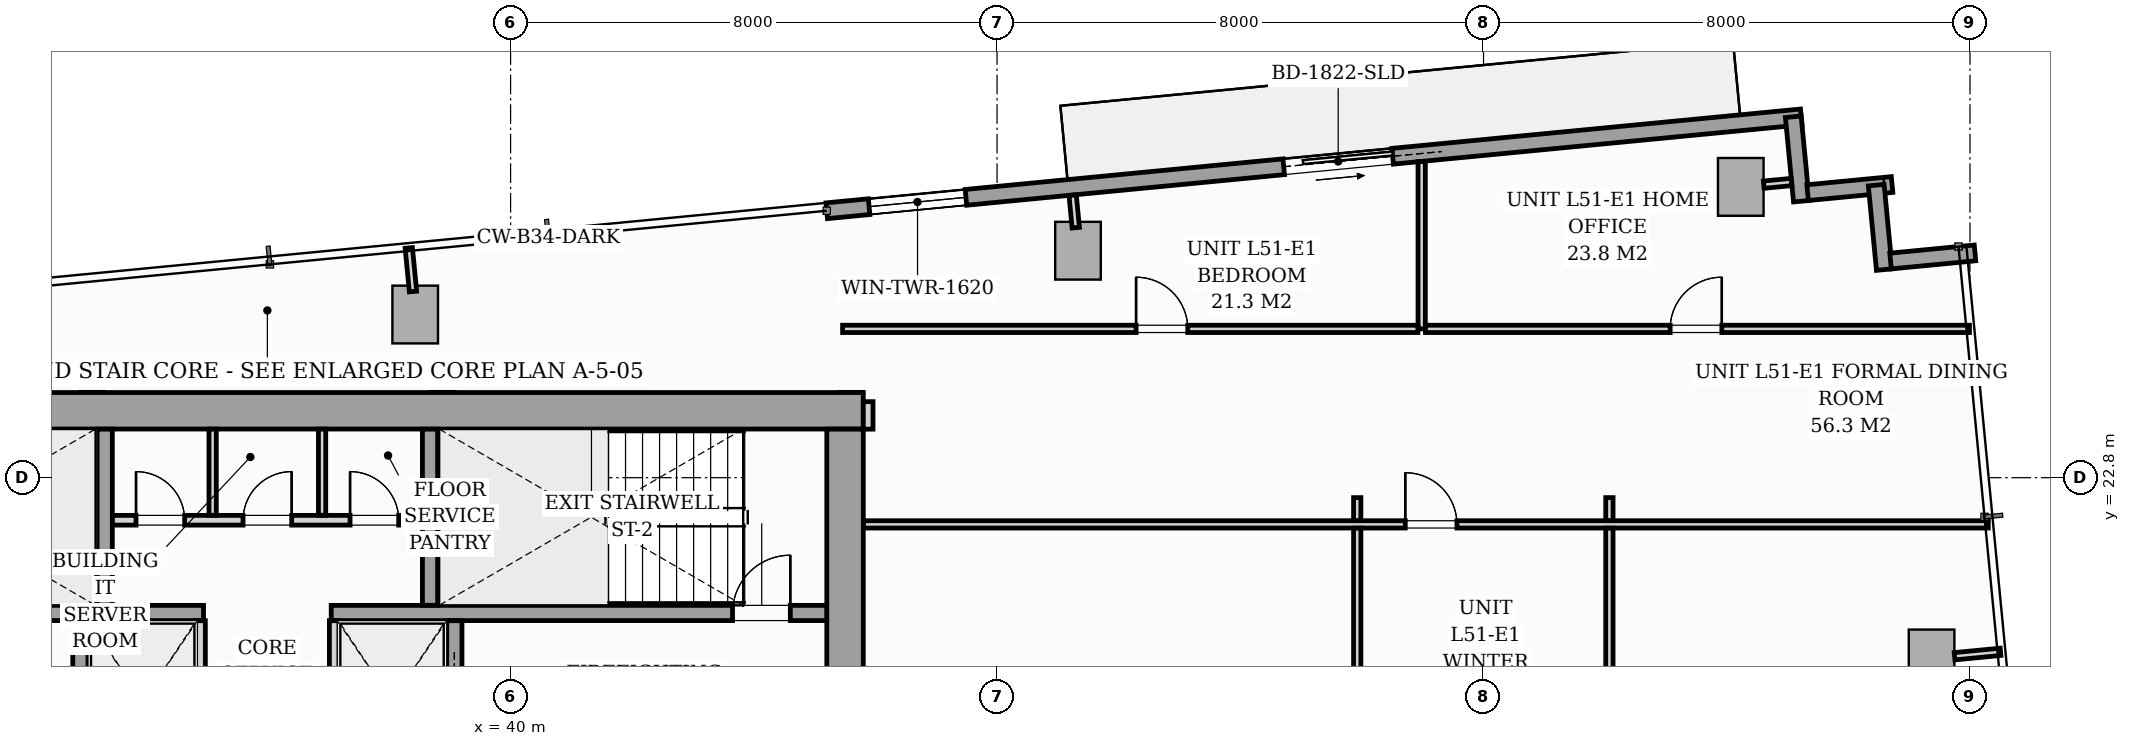
"""IFC4 building model, lengths in metres.
Left out: names, types, materials, properties, quantities, classifications, styles, units other than length and angle.
Written with IfcOpenShell. Run it as: python <this file> out.ifc"""

import sys

from ifc_helpers import new_model, si_unit, direction, frame, frame_2d, origin, origin_2d, place, context, subcontext, project, spatial, rectangle, i_section, extrude, source, transform, mapped, element, fill, save


model = new_model("IFC4")
c1 = context("Model", 3, precision=1e-05, world=origin(), true_north=direction((0.0, 1.0)))
c2 = subcontext(c1, "Body", "Model", "MODEL_VIEW")
j1 = project(units=[si_unit("LENGTHUNIT", "METRE"), si_unit("PLANEANGLEUNIT", "RADIAN")], contexts=[c1])
p1 = place(None, origin())
s1 = spatial("IfcSite", under=j1, at=p1, CompositionType="ELEMENT")
p2 = place(p1, origin())
s2 = spatial("IfcBuilding", under=s1, at=p2, CompositionType="ELEMENT")
p3 = place(p2, frame((0.0, 0.0, 179.4)))
s3 = spatial("IfcBuildingStorey", under=s2, at=p3, CompositionType="ELEMENT", Elevation=179.4)
m1 = source(origin(), c2, "Body", "SweptSolid", [
    extrude(i_section(OverallWidth=0.416, OverallDepth=0.446, WebThickness=0.039, FlangeThickness=0.063, FilletRadius=0.018, at=origin_2d()), origin(), (0.0, 0.0, 1.0), 3.196),
])
for number, where, z_axis, x_axis in (
    (1, (33.12, 24.0, 0.002), (0.0, 0.0, 1.0), (1.0, 0.0, 0.0)),
    (2, (38.88, 24.0, 0.002), (0.0, 0.0, 1.0), (1.0, 0.0, 0.0)),
    (3, (45.6, 24.0, 0.002), (0.0, 0.0, 1.0), (1.0, 0.0, 0.0)),
):
    element("IfcColumn", number, at=place(p3, frame(where, z_axis=z_axis, x_axis=x_axis)), inside=s3, PredefinedType="PILASTER", context=c2, shape_type="MappedRepresentation", body=[
        mapped(m1, transform((0.0, 0.0, 0.0), scale=1.0)),
    ])
m2 = source(origin(), c2, "Body", "SweptSolid", [
    extrude(rectangle(XDim=0.75, YDim=0.95, at=origin_2d()), origin(), (0.0, 0.0, 1.0), 3.196),
])
for number, where, z_axis, x_axis in (
    (4, (38.431, 25.483, 0.002), (0.0, 0.0, 1.0), (0.995, 0.096, 0.0)),
    (5, (49.331, 26.533, 0.002), (0.0, 0.0, 1.0), (0.995, 0.096, 0.0)),
    (6, (60.23, 27.582, 0.002), (0.0, 0.0, 1.0), (0.995, 0.096, 0.0)),
    (7, (63.368, 19.827, 0.002), (0.0, 0.0, 1.0), (0.995, 0.096, 0.0)),
):
    element("IfcColumn", number, at=place(p3, frame(where, z_axis=z_axis, x_axis=x_axis)), inside=s3, PredefinedType="COLUMN", context=c2, shape_type="MappedRepresentation", body=[
        mapped(m2, transform((0.0, 0.0, 0.0), scale=1.0)),
    ])
p4 = place(p3, frame((45.199, 27.19, 0.0), z_axis=(0.0, 0.0, 1.0), x_axis=(0.995397074604, 0.095836652014, 0.0)))
e8 = element("IfcWall", 8, at=p4, inside=s3, PredefinedType="STANDARD", context=c2, shape_type="SweptSolid", body=[
    extrude(rectangle(XDim=16.1, YDim=0.26, at=frame_2d((8.05, 0.0))), origin(), (0.0, 0.0, 1.0), 2.94),
])
p5 = place(p4, frame((7.55, 0.0, 0.0)))
e9 = element("IfcOpeningElement", 9, at=p5, cuts=e8, PredefinedType="OPENING", context=c2, shape_type="SweptSolid", body=[
    extrude(rectangle(XDim=1.8, YDim=2.06, at=frame_2d((0.9, 1.03))), frame((0.0, 0.14, 0.0), z_axis=(0.0, -1.0, 0.0), x_axis=(1.0, 0.0, 0.0)), (0.0, 0.0, 1.0), 0.28),
])
p6 = place(p4, frame((0.7, 0.0, 0.65)))
e10 = element("IfcOpeningElement", 10, at=p6, cuts=e8, PredefinedType="OPENING", context=c2, shape_type="SweptSolid", body=[
    extrude(rectangle(XDim=1.6, YDim=1.5, at=frame_2d((0.8, 0.75))), frame((0.0, 0.14, 0.0), z_axis=(0.0, -1.0, 0.0), x_axis=(1.0, 0.0, 0.0)), (0.0, 0.0, 1.0), 0.28),
])
p7 = place(p3, frame((61.094, 28.735, 0.0), z_axis=(0.0, 0.0, 1.0), x_axis=(0.095742423056, -0.99540614245, 0.0)))
e11 = element("IfcWall", 11, at=p7, inside=s3, PredefinedType="STANDARD", context=c2, shape_type="SweptSolid", body=[
    extrude(rectangle(XDim=1.395, YDim=0.26, at=frame_2d((0.697, 0.0))), origin(), (0.0, 0.0, 1.0), 2.94),
])
p8 = place(p3, frame((61.33, 27.487, 0.0), z_axis=(0.0, 0.0, 1.0), x_axis=(0.995391056452, 0.09589913835, 0.0)))
e12 = element("IfcWall", 12, at=p8, inside=s3, PredefinedType="STANDARD", context=c2, shape_type="SweptSolid", body=[
    extrude(rectangle(XDim=1.395, YDim=0.26, at=frame_2d((0.698, 0.0))), origin(), (0.0, 0.0, 1.0), 2.94),
])
for number, where, z_axis, x_axis in (
    (13, (62.458, 27.611, 0.0), (0.0, 0.0, 1.0), (0.096, -0.995, 0.0)),
    (14, (62.694, 26.363, 0.0), (0.0, 0.0, 1.0), (0.995, 0.096, 0.0)),
):
    element("IfcWall", number, at=place(p3, frame(where, z_axis=z_axis, x_axis=x_axis)), inside=s3, PredefinedType="STANDARD", context=c2, shape_type="SweptSolid", body=[
        extrude(rectangle(XDim=1.395, YDim=0.26, at=frame_2d((0.697, 0.0))), origin(), (0.0, 0.0, 1.0), 2.94),
    ])
p9 = place(p3, frame((26.2, 23.9, 0.0), z_axis=(0.0, 0.0, 1.0), x_axis=(1.0, 0.0, 0.0)))
e15 = element("IfcWall", 15, at=p9, inside=s3, PredefinedType="SHEAR", context=c2, shape_type="SweptSolid", body=[
    extrude(rectangle(XDim=19.6, YDim=0.6, at=frame_2d((9.8, 0.0))), origin(), (0.0, 0.0, 1.0), 3.2),
])
p10 = place(p3, frame((45.5, 17.802, 0.0), z_axis=(0.0, 0.0, 1.0), x_axis=(0.0, 1.0, 0.0)))
e16 = element("IfcWall", 16, at=p10, inside=s3, PredefinedType="SHEAR", context=c2, shape_type="SweptSolid", body=[
    extrude(rectangle(XDim=5.796, YDim=0.6, at=frame_2d((2.898, 0.0))), origin(), (0.0, 0.0, 1.0), 3.2),
])
p11 = place(p3, frame((26.802, 20.575, 0.0), z_axis=(0.0, 0.0, 1.0), x_axis=(1.0, 0.0, 0.0)))
e17 = element("IfcWall", 17, at=p11, inside=s3, PredefinedType="SOLIDWALL", context=c2, shape_type="SweptSolid", body=[
    extrude(rectangle(XDim=8.148, YDim=0.25, at=frame_2d((4.074, 0.0))), origin(), (0.0, 0.0, 1.0), 3.2),
])
p12 = place(p11, frame((0.298, 0.0, 0.0)))
e18 = element("IfcOpeningElement", 18, at=p12, cuts=e17, PredefinedType="OPENING", context=c2, shape_type="SweptSolid", body=[
    extrude(rectangle(XDim=0.95, YDim=2.06, at=frame_2d((0.475, 1.03))), frame((0.0, 0.135, 0.0), z_axis=(0.0, -1.0, 0.0), x_axis=(1.0, 0.0, 0.0)), (0.0, 0.0, 1.0), 0.27),
])
p13 = place(p3, frame((37.05, 20.575, 0.0), z_axis=(0.0, 0.0, 1.0), x_axis=(1.0, 0.0, 0.0)))
e19 = element("IfcWall", 19, at=p13, inside=s3, PredefinedType="SOLIDWALL", context=c2, shape_type="SweptSolid", body=[
    extrude(rectangle(XDim=8.148, YDim=0.25, at=frame_2d((4.074, 0.0))), origin(), (0.0, 0.0, 1.0), 3.2),
])
p14 = place(p13, frame((6.6, 0.0, 0.0)))
e20 = element("IfcOpeningElement", 20, at=p14, cuts=e19, PredefinedType="OPENING", context=c2, shape_type="SweptSolid", body=[
    extrude(rectangle(XDim=0.95, YDim=2.06, at=frame_2d((0.475, 1.03))), frame((0.0, 0.135, 0.0), z_axis=(0.0, -1.0, 0.0), x_axis=(1.0, 0.0, 0.0)), (0.0, 0.0, 1.0), 0.27),
])
for number, where, z_axis, x_axis in (
    (21, (33.325, 20.702, 0.0), (0.0, 0.0, 1.0), (0.0, 1.0, 0.0)),
    (22, (38.675, 20.702, 0.0), (0.0, 0.0, 1.0), (0.0, 1.0, 0.0)),
):
    element("IfcWall", number, at=place(p3, frame(where, z_axis=z_axis, x_axis=x_axis)), inside=s3, PredefinedType="SOLIDWALL", context=c2, shape_type="SweptSolid", body=[
        extrude(rectangle(XDim=2.896, YDim=0.25, at=frame_2d((1.448, 0.0))), origin(), (0.0, 0.0, 1.0), 3.2),
    ])
p15 = place(p3, frame((32.925, 17.802, 0.0), z_axis=(0.0, 0.0, 1.0), x_axis=(0.0, 1.0, 0.0)))
e23 = element("IfcWall", 23, at=p15, inside=s3, PredefinedType="SOLIDWALL", context=c2, shape_type="SweptSolid", body=[
    extrude(rectangle(XDim=2.646, YDim=0.25, at=frame_2d((1.323, 0.0))), origin(), (0.0, 0.0, 1.0), 3.2),
])
p16 = place(p15, frame((0.548, 0.0, 0.0)))
e24 = element("IfcOpeningElement", 24, at=p16, cuts=e23, PredefinedType="OPENING", context=c2, shape_type="SweptSolid", body=[
    extrude(rectangle(XDim=1.1, YDim=2.08, at=frame_2d((0.55, 1.04))), frame((0.0, 0.135, 0.0), z_axis=(0.0, -1.0, 0.0), x_axis=(1.0, 0.0, 0.0)), (0.0, 0.0, 1.0), 0.27),
])
for number, where, z_axis, x_axis in (
    (25, (34.9, 17.802, 0.0), (0.0, 0.0, 1.0), (0.0, 1.0, 0.0)),
    (26, (37.1, 17.802, 0.0), (0.0, 0.0, 1.0), (0.0, 1.0, 0.0)),
):
    element("IfcWall", number, at=place(p3, frame(where, z_axis=z_axis, x_axis=x_axis)), inside=s3, PredefinedType="PARTITIONING", context=c2, shape_type="SweptSolid", body=[
        extrude(rectangle(XDim=2.646, YDim=0.16, at=frame_2d((1.323, 0.0))), origin(), (0.0, 0.0, 1.0), 2.94),
    ])
p17 = place(p3, frame((39.075, 17.802, 0.0), z_axis=(0.0, 0.0, 1.0), x_axis=(0.0, 1.0, 0.0)))
e27 = element("IfcWall", 27, at=p17, inside=s3, PredefinedType="SOLIDWALL", context=c2, shape_type="SweptSolid", body=[
    extrude(rectangle(XDim=2.646, YDim=0.25, at=frame_2d((1.323, 0.0))), origin(), (0.0, 0.0, 1.0), 3.2),
])
p18 = place(p17, frame((0.548, 0.0, 0.0)))
e28 = element("IfcOpeningElement", 28, at=p18, cuts=e27, PredefinedType="OPENING", context=c2, shape_type="SweptSolid", body=[
    extrude(rectangle(XDim=1.1, YDim=2.08, at=frame_2d((0.55, 1.04))), frame((0.0, 0.135, 0.0), z_axis=(0.0, -1.0, 0.0), x_axis=(1.0, 0.0, 0.0)), (0.0, 0.0, 1.0), 0.27),
])
p19 = place(p3, frame((33.452, 22.1, 0.0), z_axis=(0.0, 0.0, 1.0), x_axis=(1.0, 0.0, 0.0)))
e29 = element("IfcWall", 29, at=p19, inside=s3, PredefinedType="PARTITIONING", context=c2, shape_type="SweptSolid", body=[
    extrude(rectangle(XDim=5.096, YDim=0.16, at=frame_2d((2.548, 0.0))), origin(), (0.0, 0.0, 1.0), 2.94),
])
p20 = place(p19, frame((0.388, 0.0, 0.0)))
e30 = element("IfcOpeningElement", 30, at=p20, cuts=e29, PredefinedType="OPENING", context=c2, shape_type="SweptSolid", body=[
    extrude(rectangle(XDim=0.8, YDim=2.05, at=frame_2d((0.4, 1.025))), frame((0.0, 0.09, 0.0), z_axis=(0.0, -1.0, 0.0), x_axis=(1.0, 0.0, 0.0)), (0.0, 0.0, 1.0), 0.18),
])
p21 = place(p19, frame((2.148, 0.0, 0.0)))
e31 = element("IfcOpeningElement", 31, at=p21, cuts=e29, PredefinedType="OPENING", context=c2, shape_type="SweptSolid", body=[
    extrude(rectangle(XDim=0.8, YDim=2.05, at=frame_2d((0.4, 1.025))), frame((0.0, 0.09, 0.0), z_axis=(0.0, -1.0, 0.0), x_axis=(1.0, 0.0, 0.0)), (0.0, 0.0, 1.0), 0.18),
])
p22 = place(p19, frame((3.908, 0.0, 0.0)))
e32 = element("IfcOpeningElement", 32, at=p22, cuts=e29, PredefinedType="OPENING", context=c2, shape_type="SweptSolid", body=[
    extrude(rectangle(XDim=0.8, YDim=2.05, at=frame_2d((0.4, 1.025))), frame((0.0, 0.09, 0.0), z_axis=(0.0, -1.0, 0.0), x_axis=(1.0, 0.0, 0.0)), (0.0, 0.0, 1.0), 0.18),
])
for number, where, z_axis, x_axis in (
    (33, (35.1, 22.182, 0.0), (0.0, 0.0, 1.0), (0.0, 1.0, 0.0)),
    (34, (36.9, 22.182, 0.0), (0.0, 0.0, 1.0), (0.0, 1.0, 0.0)),
):
    element("IfcWall", number, at=place(p3, frame(where, z_axis=z_axis, x_axis=x_axis)), inside=s3, PredefinedType="PARTITIONING", context=c2, shape_type="SweptSolid", body=[
        extrude(rectangle(XDim=1.416, YDim=0.12, at=frame_2d((0.708, 0.0))), origin(), (0.0, 0.0, 1.0), 2.94),
    ])
p23 = place(p3, frame((45.88, 23.598, 0.0), z_axis=(0.0, 0.0, 1.0), x_axis=(0.0, 1.0, 0.0)))
e35 = element("IfcWall", 35, at=p23, inside=s3, PredefinedType="PARTITIONING", context=c2, shape_type="SweptSolid", body=[
    extrude(rectangle(XDim=0.452, YDim=0.16, at=frame_2d((0.226, 0.0))), origin(), (0.0, 0.0, 1.0), 2.94),
])
p24 = place(p3, frame((54.983, 25.247, 0.0), z_axis=(0.0, 0.0, 1.0), x_axis=(0.0, 1.0, 0.0)))
e36 = element("IfcWall", 36, at=p24, inside=s3, PredefinedType="PARTITIONING", context=c2, shape_type="SweptSolid", body=[
    extrude(rectangle(XDim=2.752, YDim=0.12, at=frame_2d((1.376, 0.0))), origin(), (0.0, 0.0, 1.0), 2.94),
])
p25 = place(p3, frame((45.46, 25.247, 0.0), z_axis=(0.0, 0.0, 1.0), x_axis=(1.0, 0.0, 0.0)))
e37 = element("IfcWall", 37, at=p25, inside=s3, PredefinedType="PARTITIONING", context=c2, shape_type="SweptSolid", body=[
    extrude(rectangle(XDim=9.461, YDim=0.12, at=frame_2d((4.73, 0.0))), origin(), (0.0, 0.0, 1.0), 2.94),
])
p26 = place(p25, frame((4.826, 0.0, 0.0)))
e38 = element("IfcOpeningElement", 38, at=p26, cuts=e37, PredefinedType="OPENING", context=c2, shape_type="SweptSolid", body=[
    extrude(rectangle(XDim=0.85, YDim=2.05, at=frame_2d((0.425, 1.025))), frame((0.0, 0.07, 0.0), z_axis=(0.0, -1.0, 0.0), x_axis=(1.0, 0.0, 0.0)), (0.0, 0.0, 1.0), 0.14),
])
p27 = place(p3, frame((55.045, 25.247, 0.0), z_axis=(0.0, 0.0, 1.0), x_axis=(1.0, 0.0, 0.0)))
e39 = element("IfcWall", 39, at=p27, inside=s3, PredefinedType="PARTITIONING", context=c2, shape_type="SweptSolid", body=[
    extrude(rectangle(XDim=8.947, YDim=0.12, at=frame_2d((4.473, 0.0))), origin(), (0.0, 0.0, 1.0), 2.94),
])
p28 = place(p27, frame((4.024, 0.0, 0.0)))
e40 = element("IfcOpeningElement", 40, at=p28, cuts=e39, PredefinedType="OPENING", context=c2, shape_type="SweptSolid", body=[
    extrude(rectangle(XDim=0.85, YDim=2.05, at=frame_2d((0.425, 1.025))), frame((0.0, 0.07, 0.0), z_axis=(0.0, -1.0, 0.0), x_axis=(1.0, 0.0, 0.0)), (0.0, 0.0, 1.0), 0.14),
])
p29 = place(p3, frame((45.802, 22.032, 0.0), z_axis=(0.0, 0.0, 1.0), x_axis=(1.0, 0.0, 0.0)))
e41 = element("IfcWall", 41, at=p29, inside=s3, PredefinedType="PARTITIONING", context=c2, shape_type="SweptSolid", body=[
    extrude(rectangle(XDim=18.499, YDim=0.12, at=frame_2d((9.25, 0.0))), origin(), (0.0, 0.0, 1.0), 2.94),
])
p30 = place(p29, frame((8.911, 0.0, 0.0)))
e42 = element("IfcOpeningElement", 42, at=p30, cuts=e41, PredefinedType="OPENING", context=c2, shape_type="SweptSolid", body=[
    extrude(rectangle(XDim=0.85, YDim=2.05, at=frame_2d((0.425, 1.025))), frame((0.0, 0.07, 0.0), z_axis=(0.0, -1.0, 0.0), x_axis=(1.0, 0.0, 0.0)), (0.0, 0.0, 1.0), 0.14),
])
p31 = place(p3, frame((58.07, 11.495, 0.0), z_axis=(0.0, 0.0, 1.0), x_axis=(0.0, 1.0, 0.0)))
e43 = element("IfcWall", 43, at=p31, inside=s3, PredefinedType="PARTITIONING", context=c2, shape_type="SweptSolid", body=[
    extrude(rectangle(XDim=10.475, YDim=0.12, at=frame_2d((5.237, 0.0))), origin(), (0.0, 0.0, 1.0), 2.94),
])
p32 = place(p31, frame((4.812, 0.0, 0.0)))
e44 = element("IfcOpeningElement", 44, at=p32, cuts=e43, PredefinedType="OPENING", context=c2, shape_type="SweptSolid", body=[
    extrude(rectangle(XDim=0.85, YDim=2.05, at=frame_2d((0.425, 1.025))), frame((0.0, 0.07, 0.0), z_axis=(0.0, -1.0, 0.0), x_axis=(1.0, 0.0, 0.0)), (0.0, 0.0, 1.0), 0.14),
])
p33 = place(p3, frame((58.07, 22.094, 0.0), z_axis=(0.0, 0.0, 1.0), x_axis=(0.0, 1.0, 0.0)))
e45 = element("IfcWall", 45, at=p33, inside=s3, PredefinedType="PARTITIONING", context=c2, shape_type="SweptSolid", body=[
    extrude(rectangle(XDim=0.378, YDim=0.12, at=frame_2d((0.189, 0.0))), origin(), (0.0, 0.0, 1.0), 2.94),
])
p34 = place(p3, frame((53.923, 11.495, 0.0), z_axis=(0.0, 0.0, 1.0), x_axis=(0.0, 1.0, 0.0)))
e46 = element("IfcWall", 46, at=p34, inside=s3, PredefinedType="PARTITIONING", context=c2, shape_type="SweptSolid", body=[
    extrude(rectangle(XDim=10.475, YDim=0.12, at=frame_2d((5.237, 0.0))), origin(), (0.0, 0.0, 1.0), 2.94),
])
p35 = place(p34, frame((4.812, 0.0, 0.0)))
e47 = element("IfcOpeningElement", 47, at=p35, cuts=e46, PredefinedType="OPENING", context=c2, shape_type="SweptSolid", body=[
    extrude(rectangle(XDim=0.85, YDim=2.05, at=frame_2d((0.425, 1.025))), frame((0.0, 0.07, 0.0), z_axis=(0.0, -1.0, 0.0), x_axis=(1.0, 0.0, 0.0)), (0.0, 0.0, 1.0), 0.14),
])
p36 = place(p3, frame((53.923, 22.094, 0.0), z_axis=(0.0, 0.0, 1.0), x_axis=(0.0, 1.0, 0.0)))
e48 = element("IfcWall", 48, at=p36, inside=s3, PredefinedType="PARTITIONING", context=c2, shape_type="SweptSolid", body=[
    extrude(rectangle(XDim=0.378, YDim=0.12, at=frame_2d((0.189, 0.0))), origin(), (0.0, 0.0, 1.0), 2.94),
])
p37 = place(p3, frame((38.395, 25.861, 0.0), z_axis=(0.0, 0.0, 1.0), x_axis=(-0.095977354523, 0.995383517755, 0.0)))
e49 = element("IfcWall", 49, at=p37, inside=s3, PredefinedType="PARTITIONING", context=c2, shape_type="SweptSolid", body=[
    extrude(rectangle(XDim=0.72, YDim=0.12, at=frame_2d((0.36, 0.0))), origin(), (0.0, 0.0, 1.0), 2.94),
])
p38 = place(p3, frame((49.294, 26.911, 0.0), z_axis=(0.0, 0.0, 1.0), x_axis=(-0.095772948675, 0.995403205893, 0.0)))
e50 = element("IfcWall", 50, at=p38, inside=s3, PredefinedType="PARTITIONING", context=c2, shape_type="SweptSolid", body=[
    extrude(rectangle(XDim=0.538, YDim=0.12, at=frame_2d((0.269, 0.0))), origin(), (0.0, 0.0, 1.0), 2.94),
])
p39 = place(p3, frame((60.609, 27.618, 0.0), z_axis=(0.0, 0.0, 1.0), x_axis=(0.995384576284, 0.09596637586, 0.0)))
e51 = element("IfcWall", 51, at=p39, inside=s3, PredefinedType="PARTITIONING", context=c2, shape_type="SweptSolid", body=[
    extrude(rectangle(XDim=0.458, YDim=0.12, at=frame_2d((0.229, 0.0))), origin(), (0.0, 0.0, 1.0), 2.94),
])
p40 = place(p3, frame((63.747, 19.864, 0.0), z_axis=(0.0, 0.0, 1.0), x_axis=(0.995405496295, 0.095749140702, 0.0)))
e52 = element("IfcWall", 52, at=p40, inside=s3, PredefinedType="PARTITIONING", context=c2, shape_type="SweptSolid", body=[
    extrude(rectangle(XDim=0.76, YDim=0.12, at=frame_2d((0.38, 0.0))), origin(), (0.0, 0.0, 1.0), 2.94),
])
m3 = source(origin(), c2, "Body", "SweptSolid", [
    extrude(rectangle(XDim=1.8, YDim=2.06, at=frame_2d((0.9, 1.03))), frame((0.0, 0.025, 0.0), z_axis=(0.0, -1.0, 0.0), x_axis=(1.0, 0.0, 0.0)), (0.0, 0.0, 1.0), 0.05),
])
p41 = place(p5, origin())
e53 = element("IfcDoor", 53, at=p41, inside=s3, OperationType="SLIDING_TO_RIGHT", PredefinedType="DOOR", context=c2, shape_type="MappedRepresentation", body=[
    mapped(m3, transform((0.0, 0.0, 0.0), scale=1.0)),
])
fill(e9, e53)
m4 = source(origin(), c2, "Body", "SweptSolid", [
    extrude(rectangle(XDim=1.6, YDim=1.5, at=frame_2d((0.8, 0.75))), frame((0.0, 0.03, 0.0), z_axis=(0.0, -1.0, 0.0), x_axis=(1.0, 0.0, 0.0)), (0.0, 0.0, 1.0), 0.06),
])
p42 = place(p6, origin())
e54 = element("IfcWindow", 54, at=p42, inside=s3, PartitioningType="SINGLE_PANEL", PredefinedType="WINDOW", context=c2, shape_type="MappedRepresentation", body=[
    mapped(m4, transform((0.0, 0.0, 0.0), scale=1.0)),
])
fill(e10, e54)
m5 = source(origin(), c2, "Body", "SweptSolid", [
    extrude(rectangle(XDim=0.95, YDim=2.06, at=frame_2d((0.475, 1.03))), frame((0.0, 0.025, 0.0), z_axis=(0.0, -1.0, 0.0), x_axis=(1.0, 0.0, 0.0)), (0.0, 0.0, 1.0), 0.05),
])
p43 = place(p14, origin())
e55 = element("IfcDoor", 55, at=p43, inside=s3, OperationType="SINGLE_SWING_RIGHT", PredefinedType="DOOR", context=c2, shape_type="MappedRepresentation", body=[
    mapped(m5, transform((0.0, 0.0, 0.0), scale=1.0)),
])
fill(e20, e55)
m6 = source(origin(), c2, "Body", "SweptSolid", [
    extrude(rectangle(XDim=0.8, YDim=2.05, at=frame_2d((0.4, 1.025))), frame((0.0, 0.025, 0.0), z_axis=(0.0, -1.0, 0.0), x_axis=(1.0, 0.0, 0.0)), (0.0, 0.0, 1.0), 0.05),
])
p44 = place(p20, origin())
e56 = element("IfcDoor", 56, at=p44, inside=s3, OperationType="SINGLE_SWING_LEFT", PredefinedType="DOOR", context=c2, shape_type="MappedRepresentation", body=[
    mapped(m6, transform((0.0, 0.0, 0.0), scale=1.0)),
])
fill(e30, e56)
p45 = place(p21, origin())
e57 = element("IfcDoor", 57, at=p45, inside=s3, OperationType="SINGLE_SWING_RIGHT", PredefinedType="DOOR", context=c2, shape_type="MappedRepresentation", body=[
    mapped(m6, transform((0.0, 0.0, 0.0), scale=1.0)),
])
fill(e31, e57)
p46 = place(p22, origin())
e58 = element("IfcDoor", 58, at=p46, inside=s3, OperationType="SINGLE_SWING_LEFT", PredefinedType="DOOR", context=c2, shape_type="MappedRepresentation", body=[
    mapped(m6, transform((0.0, 0.0, 0.0), scale=1.0)),
])
fill(e32, e58)
m7 = source(origin(), c2, "Body", "SweptSolid", [
    extrude(rectangle(XDim=0.85, YDim=2.05, at=frame_2d((0.425, 1.025))), frame((0.0, 0.025, 0.0), z_axis=(0.0, -1.0, 0.0), x_axis=(1.0, 0.0, 0.0)), (0.0, 0.0, 1.0), 0.05),
])
p47 = place(p26, origin())
e59 = element("IfcDoor", 59, at=p47, inside=s3, OperationType="SINGLE_SWING_LEFT", PredefinedType="DOOR", context=c2, shape_type="MappedRepresentation", body=[
    mapped(m7, transform((0.0, 0.0, 0.0), scale=1.0)),
])
fill(e38, e59)
p48 = place(p28, origin())
e60 = element("IfcDoor", 60, at=p48, inside=s3, OperationType="SINGLE_SWING_RIGHT", PredefinedType="DOOR", context=c2, shape_type="MappedRepresentation", body=[
    mapped(m7, transform((0.0, 0.0, 0.0), scale=1.0)),
])
fill(e40, e60)
p49 = place(p30, origin())
e61 = element("IfcDoor", 61, at=p49, inside=s3, OperationType="SINGLE_SWING_LEFT", PredefinedType="DOOR", context=c2, shape_type="MappedRepresentation", body=[
    mapped(m7, transform((0.0, 0.0, 0.0), scale=1.0)),
])
fill(e42, e61)
save(model, sys.argv[1])
